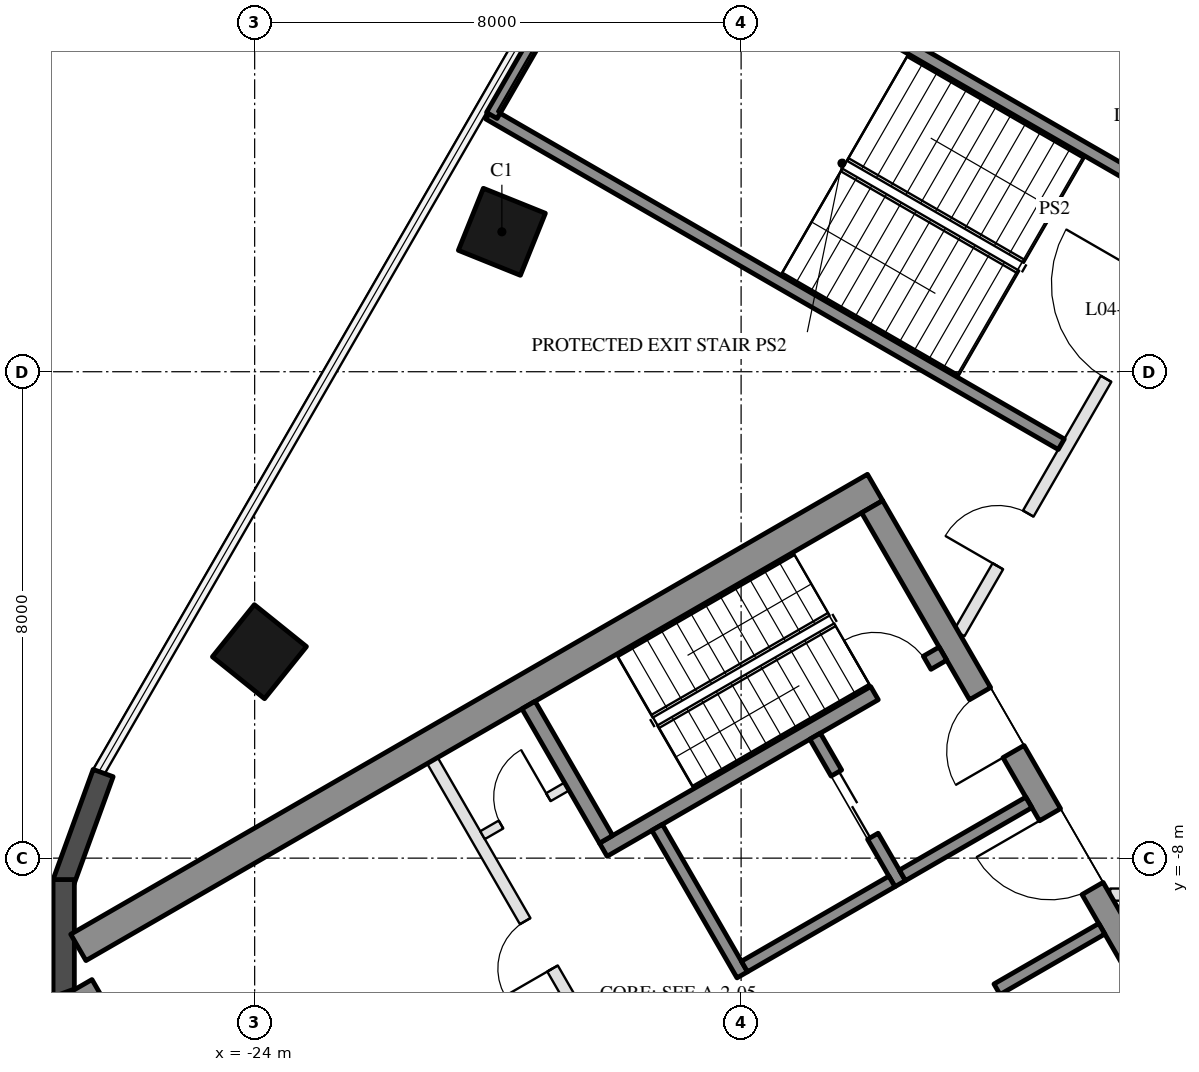
"""IFC4 building model, lengths in metres.
Left out: names, types, materials, properties, quantities, classifications, styles, units other than length and angle.
Written with IfcOpenShell. Run it as: python <this file> out.ifc"""

import sys

from ifc_helpers import new_model, si_unit, direction, frame, frame_2d, origin, origin_2d, place, context, subcontext, project, spatial, rectangle, hollow_rectangle, extrude, boolean, halfspace, element, fill, save


model = new_model("IFC4")
c1 = context("Model", 3, precision=1e-05, world=origin(), true_north=direction((0.0, 1.0)))
c2 = subcontext(c1, "Body", "Model", "MODEL_VIEW")
j1 = project(units=[si_unit("LENGTHUNIT", "METRE"), si_unit("PLANEANGLEUNIT", "RADIAN")], contexts=[c1])
p1 = place(None, origin())
s1 = spatial("IfcSite", under=j1, at=p1, CompositionType="ELEMENT")
p2 = place(p1, origin())
s2 = spatial("IfcBuilding", under=s1, at=p2, CompositionType="ELEMENT")
p3 = place(p2, frame((0.0, 0.0, 28.5)))
s3 = spatial("IfcBuildingStorey", under=s2, at=p3, CompositionType="ELEMENT", Elevation=28.5)
p4 = place(p3, frame((-19.934, 2.301, 0.0), z_axis=(0.032751169552, -0.004609022205, 0.999452909249), x_axis=(-0.499064961058, -0.866476451895, 0.012358112959)))
e1 = element("IfcColumn", 1, at=p4, inside=s3, PredefinedType="COLUMN", context=c2, shape_type="SweptSolid", body=[
    boolean("DIFFERENCE", boolean("DIFFERENCE", extrude(hollow_rectangle(XDim=1.1, YDim=1.1, WallThickness=0.05, at=origin_2d()), origin(), (0.0, 0.0, 1.0), 4.502), halfspace(frame((0.0, 0.0, 0.011), z_axis=(0.0, 0.0, 1.0), x_axis=(1.0, 0.0, 0.0)), True)), halfspace(frame((0.0, 0.0, 4.492), z_axis=(0.0, 0.0, 1.0), x_axis=(1.0, 0.0, 0.0)), False)),
])
p5 = place(p3, frame((-23.921, -4.604, 0.0), z_axis=(0.038923767258, 0.006017462626, 0.999224064205), x_axis=(-0.500000890421, -0.865672860901, 0.024690230408)))
e2 = element("IfcColumn", 2, at=p5, inside=s3, PredefinedType="COLUMN", context=c2, shape_type="SweptSolid", body=[
    boolean("DIFFERENCE", boolean("DIFFERENCE", extrude(hollow_rectangle(XDim=1.1, YDim=1.1, WallThickness=0.05, at=origin_2d()), origin(), (0.0, 0.0, 1.0), 4.503), halfspace(frame((0.0, 0.0, 0.013), z_axis=(0.0, 0.0, 1.0), x_axis=(1.0, 0.0, 0.0)), True)), halfspace(frame((0.0, 0.0, 4.491), z_axis=(0.0, 0.0, 1.0), x_axis=(1.0, 0.0, 0.0)), False)),
])
for number, where, z_axis, x_axis in (
    (3, (-26.491, -6.601, 0.0), (0.0, 0.0, 1.0), (-0.342, -0.94, 0.0)),
    (4, (-27.14, -8.353, 0.0), (0.0, 0.0, 1.0), (0.0, -1.0, 0.0)),
    (5, (-27.151, -10.221, 0.0), (0.0, 0.0, 1.0), (0.342, -0.94, 0.0)),
):
    element("IfcWall", number, at=place(p3, frame(where, z_axis=z_axis, x_axis=x_axis)), inside=s3, PredefinedType="SOLIDWALL", context=c2, shape_type="SweptSolid", body=[
        extrude(rectangle(XDim=1.928, YDim=0.35, at=frame_2d((0.964, 0.0))), origin(), (0.0, 0.0, 1.0), 4.2),
    ])
p6 = place(p3, frame((-13.797, -1.903, 0.0), z_axis=(0.0, 0.0, 1.0), x_axis=(-0.866025168306, -0.500000407861, 0.0)))
e6 = element("IfcWall", 6, at=p6, inside=s3, PredefinedType="SHEAR", context=c2, shape_type="SweptSolid", body=[
    extrude(rectangle(XDim=15.13, YDim=0.5, at=frame_2d((7.565, 0.0))), origin(), (0.0, 0.0, 1.0), 4.2),
])
p7 = place(p3, frame((-13.845, -2.22, 0.0), z_axis=(0.0, 0.0, 1.0), x_axis=(0.500004234368, -0.866022959057, 0.0)))
e7 = element("IfcWall", 7, at=p7, inside=s3, PredefinedType="SHEAR", context=c2, shape_type="SweptSolid", body=[
    extrude(rectangle(XDim=10.0, YDim=0.4, at=frame_2d((5.0, 0.0))), origin(), (0.0, 0.0, 1.0), 4.2),
])
p8 = place(p7, frame((3.55, 0.0, 0.0)))
e8 = element("IfcOpeningElement", 8, at=p8, cuts=e7, PredefinedType="OPENING", context=c2, shape_type="SweptSolid", body=[
    extrude(rectangle(XDim=1.1, YDim=2.1, at=frame_2d((0.55, 1.05))), frame((0.0, 0.21, 0.0), z_axis=(0.0, -1.0, 0.0), x_axis=(1.0, 0.0, 0.0)), (0.0, 0.0, 1.0), 0.42),
])
p9 = place(p7, frame((5.85, 0.0, 0.0)))
e9 = element("IfcOpeningElement", 9, at=p9, cuts=e7, PredefinedType="OPENING", context=c2, shape_type="SweptSolid", body=[
    extrude(rectangle(XDim=1.4, YDim=2.1, at=frame_2d((0.7, 1.05))), frame((0.0, 0.21, 0.0), z_axis=(0.0, -1.0, 0.0), x_axis=(1.0, 0.0, 0.0)), (0.0, 0.0, 1.0), 0.42),
])
p10 = place(p3, frame((-26.848, -10.097, 0.0), z_axis=(0.0, 0.0, 1.0), x_axis=(0.499932877268, -0.866064153644, 0.0)))
e10 = element("IfcWall", 10, at=p10, inside=s3, PredefinedType="SHEAR", context=c2, shape_type="SweptSolid", body=[
    extrude(rectangle(XDim=3.08, YDim=0.4, at=frame_2d((1.54, 0.0))), origin(), (0.0, 0.0, 1.0), 4.2),
])
p11 = place(p3, frame((-12.681, -4.636, 0.0), z_axis=(0.0, 0.0, 1.0), x_axis=(-0.866021702275, -0.500006411147, 0.0)))
e11 = element("IfcWall", 11, at=p11, inside=s3, PredefinedType="SHEAR", context=c2, shape_type="SweptSolid", body=[
    extrude(rectangle(XDim=6.45, YDim=0.25, at=frame_2d((3.225, 0.0))), origin(), (0.0, 0.0, 1.0), 4.2),
])
p12 = place(p11, frame((0.3, 0.0, 0.0)))
e12 = element("IfcOpeningElement", 12, at=p12, cuts=e11, PredefinedType="OPENING", context=c2, shape_type="SweptSolid", body=[
    extrude(rectangle(XDim=1.0, YDim=2.1, at=frame_2d((0.5, 1.05))), frame((0.0, 0.135, 0.0), z_axis=(0.0, -1.0, 0.0), x_axis=(1.0, 0.0, 0.0)), (0.0, 0.0, 1.0), 0.27),
])
p13 = place(p3, frame((-19.496, -5.482, 0.0), z_axis=(0.0, 0.0, 1.0), x_axis=(0.499990435942, -0.866030925526, 0.0)))
e13 = element("IfcWall", 13, at=p13, inside=s3, PredefinedType="SHEAR", context=c2, shape_type="SweptSolid", body=[
    extrude(rectangle(XDim=2.55, YDim=0.25, at=frame_2d((1.275, 0.0))), origin(), (0.0, 0.0, 1.0), 4.2),
])
p14 = place(p3, frame((-17.381, -7.495, 0.0), z_axis=(0.0, 0.0, 1.0), x_axis=(0.500011755427, -0.866018616679, 0.0)))
e14 = element("IfcWall", 14, at=p14, inside=s3, PredefinedType="SHEAR", context=c2, shape_type="SweptSolid", body=[
    extrude(rectangle(XDim=2.8, YDim=0.2, at=frame_2d((1.4, 0.0))), origin(), (0.0, 0.0, 1.0), 4.2),
])
p15 = place(p3, frame((-14.783, -5.995, 0.0), z_axis=(0.0, 0.0, 1.0), x_axis=(0.49994636267, -0.866056369097, 0.0)))
e15 = element("IfcWall", 15, at=p15, inside=s3, PredefinedType="SHEAR", context=c2, shape_type="SweptSolid", body=[
    extrude(rectangle(XDim=2.8, YDim=0.2, at=frame_2d((1.4, 0.0))), origin(), (0.0, 0.0, 1.0), 4.2),
])
p16 = place(p15, frame((0.7, 0.0, 0.0)))
e16 = element("IfcOpeningElement", 16, at=p16, cuts=e15, PredefinedType="OPENING", context=c2, shape_type="SweptSolid", body=[
    extrude(rectangle(XDim=1.2, YDim=2.1, at=frame_2d((0.6, 1.05))), frame((0.0, 0.11, 0.0), z_axis=(0.0, -1.0, 0.0), x_axis=(1.0, 0.0, 0.0)), (0.0, 0.0, 1.0), 0.22),
])
p17 = place(p3, frame((-13.52, -8.383, 0.0), z_axis=(0.0, 0.0, 1.0), x_axis=(-0.866034573852, -0.49998411664, 0.0)))
e17 = element("IfcWall", 17, at=p17, inside=s3, PredefinedType="SHEAR", context=c2, shape_type="SweptSolid", body=[
    extrude(rectangle(XDim=2.8, YDim=0.2, at=frame_2d((1.4, 0.0))), origin(), (0.0, 0.0, 1.0), 4.2),
])
p18 = place(p3, frame((-11.268, -7.083, 0.0), z_axis=(0.0, 0.0, 1.0), x_axis=(-0.866050077142, -0.499957262057, 0.0)))
e18 = element("IfcWall", 18, at=p18, inside=s3, PredefinedType="SHEAR", context=c2, shape_type="SweptSolid", body=[
    extrude(rectangle(XDim=2.4, YDim=0.2, at=frame_2d((1.2, 0.0))), origin(), (0.0, 0.0, 1.0), 4.2),
])
p19 = place(p3, frame((-10.068, -9.162, 0.0), z_axis=(0.0, 0.0, 1.0), x_axis=(-0.866032725843, -0.499987317609, 0.0)))
e19 = element("IfcWall", 19, at=p19, inside=s3, PredefinedType="SHEAR", context=c2, shape_type="SweptSolid", body=[
    extrude(rectangle(XDim=10.16, YDim=0.2, at=frame_2d((5.08, 0.0))), origin(), (0.0, 0.0, 1.0), 4.2),
])
p20 = place(p19, frame((1.99, 0.0, 0.0)))
e20 = element("IfcOpeningElement", 20, at=p20, cuts=e19, PredefinedType="OPENING", context=c2, shape_type="SweptSolid", body=[
    extrude(rectangle(XDim=0.9, YDim=2.1, at=frame_2d((0.45, 1.05))), frame((0.0, 0.11, 0.0), z_axis=(0.0, -1.0, 0.0), x_axis=(1.0, 0.0, 0.0)), (0.0, 0.0, 1.0), 0.22),
])
p21 = place(p19, frame((7.07, 0.0, 0.0)))
e21 = element("IfcOpeningElement", 21, at=p21, cuts=e19, PredefinedType="OPENING", context=c2, shape_type="SweptSolid", body=[
    extrude(rectangle(XDim=0.9, YDim=2.1, at=frame_2d((0.45, 1.05))), frame((0.0, 0.11, 0.0), z_axis=(0.0, -1.0, 0.0), x_axis=(1.0, 0.0, 0.0)), (0.0, 0.0, 1.0), 0.22),
])
p22 = place(p3, frame((-21.076, -6.395, 0.0), z_axis=(0.0, 0.0, 1.0), x_axis=(0.50001468107, -0.866016927499, 0.0)))
e22 = element("IfcWall", 22, at=p22, inside=s3, PredefinedType="PARTITIONING", context=c2, shape_type="SweptSolid", body=[
    extrude(rectangle(XDim=5.4, YDim=0.2, at=frame_2d((2.7, 0.0))), origin(), (0.0, 0.0, 1.0), 4.2),
])
p23 = place(p22, frame((3.05, 0.0, 0.0)))
e23 = element("IfcOpeningElement", 23, at=p23, cuts=e22, PredefinedType="OPENING", context=c2, shape_type="SweptSolid", body=[
    extrude(rectangle(XDim=0.9, YDim=2.1, at=frame_2d((0.45, 1.05))), frame((0.0, 0.11, 0.0), z_axis=(0.0, -1.0, 0.0), x_axis=(1.0, 0.0, 0.0)), (0.0, 0.0, 1.0), 0.22),
])
p24 = place(p3, frame((-18.866, -6.822, 0.0), z_axis=(0.0, 0.0, 1.0), x_axis=(-0.866028054938, -0.499995408039, 0.0)))
e24 = element("IfcWall", 24, at=p24, inside=s3, PredefinedType="PARTITIONING", context=c2, shape_type="SweptSolid", body=[
    extrude(rectangle(XDim=1.6, YDim=0.15, at=frame_2d((0.8, 0.0))), origin(), (0.0, 0.0, 1.0), 4.2),
])
p25 = place(p24, frame((0.35, 0.0, 0.0)))
e25 = element("IfcOpeningElement", 25, at=p25, cuts=e24, PredefinedType="OPENING", context=c2, shape_type="SweptSolid", body=[
    extrude(rectangle(XDim=0.9, YDim=2.1, at=frame_2d((0.45, 1.05))), frame((0.0, 0.085, 0.0), z_axis=(0.0, -1.0, 0.0), x_axis=(1.0, 0.0, 0.0)), (0.0, 0.0, 1.0), 0.17),
])
p26 = place(p3, frame((-9.93, -8.6, 0.0), z_axis=(0.0, 0.0, 1.0), x_axis=(1.0, 0.0, 0.0)))
e26 = element("IfcWall", 26, at=p26, inside=s3, PredefinedType="PARTITIONING", context=c2, shape_type="SweptSolid", body=[
    extrude(rectangle(XDim=19.861, YDim=0.2, at=frame_2d((9.93, 0.0))), origin(), (0.0, 0.0, 1.0), 3.41),
])
p27 = place(p26, frame((2.592, 0.0, 0.0)))
e27 = element("IfcOpeningElement", 27, at=p27, cuts=e26, PredefinedType="OPENING", context=c2, shape_type="SweptSolid", body=[
    extrude(rectangle(XDim=1.8, YDim=2.4, at=frame_2d((0.9, 1.2))), frame((0.0, 0.11, 0.0), z_axis=(0.0, -1.0, 0.0), x_axis=(1.0, 0.0, 0.0)), (0.0, 0.0, 1.0), 0.22),
])
p28 = place(p26, frame((9.575, 0.0, 0.0)))
e28 = element("IfcOpeningElement", 28, at=p28, cuts=e26, PredefinedType="OPENING", context=c2, shape_type="SweptSolid", body=[
    extrude(rectangle(XDim=1.8, YDim=2.4, at=frame_2d((0.9, 1.2))), frame((0.0, 0.11, 0.0), z_axis=(0.0, -1.0, 0.0), x_axis=(1.0, 0.0, 0.0)), (0.0, 0.0, 1.0), 0.22),
])
p29 = place(p26, frame((16.377, 0.0, 0.0)))
e29 = element("IfcOpeningElement", 29, at=p29, cuts=e26, PredefinedType="OPENING", context=c2, shape_type="SweptSolid", body=[
    extrude(rectangle(XDim=1.0, YDim=2.1, at=frame_2d((0.5, 1.05))), frame((0.0, 0.11, 0.0), z_axis=(0.0, -1.0, 0.0), x_axis=(1.0, 0.0, 0.0)), (0.0, 0.0, 1.0), 0.22),
])
p30 = place(p3, frame((-16.511, 10.63, 0.0), z_axis=(0.0, 0.0, 1.0), x_axis=(0.866022430415, -0.500005149991, 0.0)))
e30 = element("IfcWall", 30, at=p30, inside=s3, PredefinedType="PARTITIONING", context=c2, shape_type="SweptSolid", body=[
    extrude(rectangle(XDim=10.915, YDim=0.15, at=frame_2d((5.457, 0.0))), origin(), (0.0, 0.0, 1.0), 3.6),
])
p31 = place(p3, frame((-17.948, 8.053, 0.0), z_axis=(0.0, 0.0, 1.0), x_axis=(0.86602026553, -0.500008899612, 0.0)))
e31 = element("IfcWall", 31, at=p31, inside=s3, PredefinedType="SOLIDWALL", context=c2, shape_type="SweptSolid", body=[
    extrude(rectangle(XDim=10.87, YDim=0.2, at=frame_2d((5.435, 0.0))), origin(), (0.0, 0.0, 1.0), 4.2),
])
p32 = place(p3, frame((-20.148, 4.242, 0.0), z_axis=(0.0, 0.0, 1.0), x_axis=(0.866025880615, -0.499999174104, 0.0)))
e32 = element("IfcWall", 32, at=p32, inside=s3, PredefinedType="SOLIDWALL", context=c2, shape_type="SweptSolid", body=[
    extrude(rectangle(XDim=10.87, YDim=0.2, at=frame_2d((5.435, 0.0))), origin(), (0.0, 0.0, 1.0), 4.2),
])
p33 = place(p3, frame((-2.482, 12.9, 0.0), z_axis=(0.0, 0.0, 1.0), x_axis=(-0.50000478328, -0.866022642139, 0.0)))
e33 = element("IfcWall", 33, at=p33, inside=s3, PredefinedType="PARTITIONING", context=c2, shape_type="SweptSolid", body=[
    extrude(rectangle(XDim=19.861, YDim=0.2, at=frame_2d((9.931, 0.0))), origin(), (0.0, 0.0, 1.0), 3.41),
])
p34 = place(p33, frame((13.23, 0.0, 0.0)))
e34 = element("IfcOpeningElement", 34, at=p34, cuts=e33, PredefinedType="OPENING", context=c2, shape_type="SweptSolid", body=[
    extrude(rectangle(XDim=1.8, YDim=2.1, at=frame_2d((0.9, 1.05))), frame((0.0, 0.11, 0.0), z_axis=(0.0, -1.0, 0.0), x_axis=(1.0, 0.0, 0.0)), (0.0, 0.0, 1.0), 0.22),
])
p35 = place(p33, frame((1.634, 0.0, 0.0)))
e35 = element("IfcOpeningElement", 35, at=p35, cuts=e33, PredefinedType="OPENING", context=c2, shape_type="SweptSolid", body=[
    extrude(rectangle(XDim=1.2, YDim=2.1, at=frame_2d((0.6, 1.05))), frame((0.0, 0.11, 0.0), z_axis=(0.0, -1.0, 0.0), x_axis=(1.0, 0.0, 0.0)), (0.0, 0.0, 1.0), 0.22),
])
p36 = place(p33, frame((6.206, 0.0, 0.0)))
e36 = element("IfcOpeningElement", 36, at=p36, cuts=e33, PredefinedType="OPENING", context=c2, shape_type="SweptSolid", body=[
    extrude(rectangle(XDim=1.0, YDim=2.1, at=frame_2d((0.5, 1.05))), frame((0.0, 0.11, 0.0), z_axis=(0.0, -1.0, 0.0), x_axis=(1.0, 0.0, 0.0)), (0.0, 0.0, 1.0), 0.22),
])
p37 = place(p33, frame((9.943, 0.0, 0.0)))
e37 = element("IfcOpeningElement", 37, at=p37, cuts=e33, PredefinedType="OPENING", context=c2, shape_type="SweptSolid", body=[
    extrude(rectangle(XDim=1.0, YDim=2.1, at=frame_2d((0.5, 1.05))), frame((0.0, 0.11, 0.0), z_axis=(0.0, -1.0, 0.0), x_axis=(1.0, 0.0, 0.0)), (0.0, 0.0, 1.0), 0.22),
])
p38 = place(p33, frame((17.59, 0.0, 0.0)))
e38 = element("IfcOpeningElement", 38, at=p38, cuts=e33, PredefinedType="OPENING", context=c2, shape_type="SweptSolid", body=[
    extrude(rectangle(XDim=1.0, YDim=2.1, at=frame_2d((0.5, 1.05))), frame((0.0, 0.11, 0.0), z_axis=(0.0, -1.0, 0.0), x_axis=(1.0, 0.0, 0.0)), (0.0, 0.0, 1.0), 0.22),
])
p39 = place(p3, frame((-17.9, 8.025, 0.0), z_axis=(0.0, 0.0, 1.0), x_axis=(-0.499988222896, -0.866032203192, 0.0)))
e39 = element("IfcWall", 39, at=p39, inside=s3, PredefinedType="SOLIDWALL", context=c2, shape_type="SweptSolid", body=[
    extrude(rectangle(XDim=4.4, YDim=0.2, at=frame_2d((2.2, 0.0))), origin(), (0.0, 0.0, 1.0), 4.2),
])
p40 = place(p16, origin())
e40 = element("IfcDoor", 40, at=p40, inside=s3, OperationType="DOUBLE_DOOR_SLIDING", PredefinedType="DOOR", context=c2, shape_type="SweptSolid", body=[
    extrude(rectangle(XDim=1.2, YDim=2.1, at=frame_2d((0.6, 1.05))), frame((0.0, 0.025, 0.0), z_axis=(0.0, -1.0, 0.0), x_axis=(1.0, 0.0, 0.0)), (0.0, 0.0, 1.0), 0.05),
])
fill(e16, e40)
p41 = place(p25, frame((0.9, 0.0, 0.0), z_axis=(0.0, 0.0, 1.0), x_axis=(-1.0, 0.0, 0.0)))
e41 = element("IfcDoor", 41, at=p41, inside=s3, OperationType="SINGLE_SWING_RIGHT", PredefinedType="DOOR", context=c2, shape_type="SweptSolid", body=[
    extrude(rectangle(XDim=0.9, YDim=2.1, at=frame_2d((0.45, 1.05))), frame((0.0, 0.025, 0.0), z_axis=(0.0, -1.0, 0.0), x_axis=(1.0, 0.0, 0.0)), (0.0, 0.0, 1.0), 0.05),
])
fill(e25, e41)
p42 = place(p20, origin())
e42 = element("IfcDoor", 42, at=p42, inside=s3, OperationType="SINGLE_SWING_LEFT", PredefinedType="DOOR", context=c2, shape_type="SweptSolid", body=[
    extrude(rectangle(XDim=0.9, YDim=2.1, at=frame_2d((0.45, 1.05))), frame((0.0, 0.025, 0.0), z_axis=(0.0, -1.0, 0.0), x_axis=(1.0, 0.0, 0.0)), (0.0, 0.0, 1.0), 0.05),
])
fill(e20, e42)
p43 = place(p23, frame((0.9, 0.0, 0.0), z_axis=(0.0, 0.0, 1.0), x_axis=(-1.0, 0.0, 0.0)))
e43 = element("IfcDoor", 43, at=p43, inside=s3, OperationType="SINGLE_SWING_LEFT", PredefinedType="DOOR", context=c2, shape_type="SweptSolid", body=[
    extrude(rectangle(XDim=0.9, YDim=2.1, at=frame_2d((0.45, 1.05))), frame((0.0, 0.025, 0.0), z_axis=(0.0, -1.0, 0.0), x_axis=(1.0, 0.0, 0.0)), (0.0, 0.0, 1.0), 0.05),
])
fill(e23, e43)
p44 = place(p8, frame((1.1, 0.0, 0.0), z_axis=(0.0, 0.0, 1.0), x_axis=(-1.0, 0.0, 0.0)))
e44 = element("IfcDoor", 44, at=p44, inside=s3, OperationType="SINGLE_SWING_LEFT", PredefinedType="DOOR", context=c2, shape_type="SweptSolid", body=[
    extrude(rectangle(XDim=1.1, YDim=2.1, at=frame_2d((0.55, 1.05))), frame((0.0, 0.025, 0.0), z_axis=(0.0, -1.0, 0.0), x_axis=(1.0, 0.0, 0.0)), (0.0, 0.0, 1.0), 0.05),
])
fill(e8, e44)
p45 = place(p9, frame((1.4, 0.0, 0.0), z_axis=(0.0, 0.0, 1.0), x_axis=(-1.0, 0.0, 0.0)))
e45 = element("IfcDoor", 45, at=p45, inside=s3, OperationType="DOUBLE_DOOR_SINGLE_SWING", PredefinedType="DOOR", context=c2, shape_type="SweptSolid", body=[
    extrude(rectangle(XDim=1.4, YDim=2.1, at=frame_2d((0.7, 1.05))), frame((0.0, 0.025, 0.0), z_axis=(0.0, -1.0, 0.0), x_axis=(1.0, 0.0, 0.0)), (0.0, 0.0, 1.0), 0.05),
])
fill(e9, e45)
p46 = place(p12, frame((1.0, 0.0, 0.0), z_axis=(0.0, 0.0, 1.0), x_axis=(-1.0, 0.0, 0.0)))
e46 = element("IfcDoor", 46, at=p46, inside=s3, OperationType="SINGLE_SWING_LEFT", PredefinedType="DOOR", context=c2, shape_type="SweptSolid", body=[
    extrude(rectangle(XDim=1.0, YDim=2.1, at=frame_2d((0.5, 1.05))), frame((0.0, 0.025, 0.0), z_axis=(0.0, -1.0, 0.0), x_axis=(1.0, 0.0, 0.0)), (0.0, 0.0, 1.0), 0.05),
])
fill(e12, e46)
p47 = place(p34, frame((1.8, 0.0, 0.0), z_axis=(0.0, 0.0, 1.0), x_axis=(-1.0, 0.0, 0.0)))
e47 = element("IfcDoor", 47, at=p47, inside=s3, OperationType="DOUBLE_DOOR_SINGLE_SWING", PredefinedType="DOOR", context=c2, shape_type="SweptSolid", body=[
    extrude(rectangle(XDim=1.8, YDim=2.1, at=frame_2d((0.9, 1.05))), frame((0.0, 0.025, 0.0), z_axis=(0.0, -1.0, 0.0), x_axis=(1.0, 0.0, 0.0)), (0.0, 0.0, 1.0), 0.05),
])
fill(e34, e47)
p48 = place(p38, frame((1.0, 0.0, 0.0), z_axis=(0.0, 0.0, 1.0), x_axis=(-1.0, 0.0, 0.0)))
e48 = element("IfcDoor", 48, at=p48, inside=s3, OperationType="SINGLE_SWING_LEFT", PredefinedType="DOOR", context=c2, shape_type="SweptSolid", body=[
    extrude(rectangle(XDim=1.0, YDim=2.1, at=frame_2d((0.5, 1.05))), frame((0.0, 0.025, 0.0), z_axis=(0.0, -1.0, 0.0), x_axis=(1.0, 0.0, 0.0)), (0.0, 0.0, 1.0), 0.05),
])
fill(e38, e48)
save(model, sys.argv[1])
